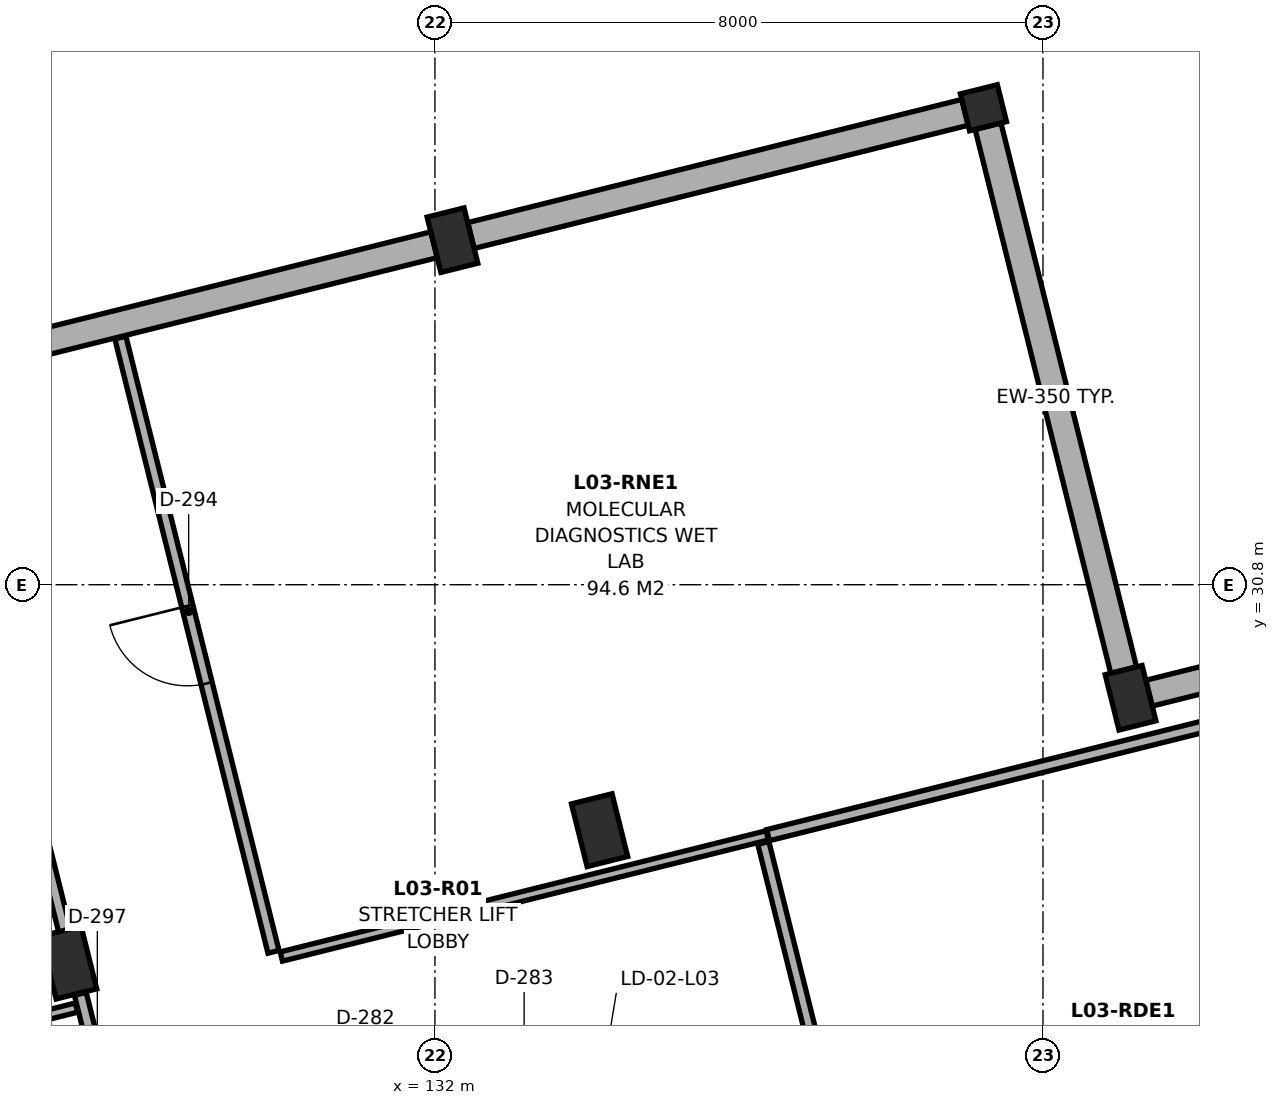
"""IFC4 building model, lengths in metres.
Left out: names, types, materials, properties, quantities, classifications, styles, units other than length and angle.
Written with IfcOpenShell. Run it as: python <this file> out.ifc"""

import sys

from ifc_helpers import new_model, si_unit, direction, frame, frame_2d, origin, origin_2d, place, context, subcontext, project, spatial, rectangle, extrude, element, fill, save


model = new_model("IFC4")
c1 = context("Model", 3, precision=1e-05, world=origin(), true_north=direction((0.0, 1.0)))
c2 = subcontext(c1, "Body", "Model", "MODEL_VIEW")
j1 = project(units=[si_unit("LENGTHUNIT", "METRE"), si_unit("PLANEANGLEUNIT", "RADIAN")], contexts=[c1])
p1 = place(None, origin())
s1 = spatial("IfcSite", under=j1, at=p1, CompositionType="ELEMENT")
p2 = place(p1, origin())
s2 = spatial("IfcBuilding", under=s1, at=p2, CompositionType="ELEMENT")
p3 = place(p2, frame((0.0, 0.0, 13.5)))
s3 = spatial("IfcBuildingStorey", under=s2, at=p3, CompositionType="ELEMENT", Elevation=13.5)
for number, where, z_axis, x_axis in (
    (1, (127.18, 25.829, 0.0), (0.0, 0.0, 1.0), (0.97, 0.242, 0.0)),
    (2, (134.166, 27.571, 0.0), (0.0, 0.0, 1.0), (0.97, 0.242, 0.0)),
):
    element("IfcColumn", number, at=place(p3, frame(where, z_axis=z_axis, x_axis=x_axis)), inside=s3, PredefinedType="COLUMN", context=c2, shape_type="SweptSolid", body=[
        extrude(rectangle(XDim=0.55, YDim=0.85, at=origin_2d()), origin(), (0.0, 0.0, 1.0), 3.72),
    ])
for number, where, z_axis, x_axis in (
    (3, (132.231, 35.333, 0.0), (0.0, 0.0, 1.0), (0.97, 0.242, 0.0)),
    (4, (141.152, 29.312, 0.0), (0.0, 0.0, 1.0), (0.97, 0.242, 0.0)),
):
    element("IfcColumn", number, at=place(p3, frame(where, z_axis=z_axis, x_axis=x_axis)), inside=s3, PredefinedType="COLUMN", context=c2, shape_type="SweptSolid", body=[
        extrude(rectangle(XDim=0.5, YDim=0.75, at=origin_2d()), origin(), (0.0, 0.0, 1.0), 3.72),
    ])
p4 = place(p3, frame((139.217, 37.075, 0.0), z_axis=(0.0, 0.0, 1.0), x_axis=(0.970295726276, 0.2419218956, 0.0)))
e5 = element("IfcColumn", 5, at=p4, inside=s3, PredefinedType="COLUMN", context=c2, shape_type="SweptSolid", body=[
    extrude(rectangle(XDim=0.5, YDim=0.5, at=origin_2d()), origin(), (0.0, 0.0, 1.0), 5.116),
])
p5 = place(p3, frame((139.277, 36.833, 0.0), z_axis=(0.0, 0.0, 1.0), x_axis=(0.241920240952, -0.970296138825, 0.0)))
e6 = element("IfcWall", 6, at=p5, inside=s3, PredefinedType="SOLIDWALL", context=c2, shape_type="SweptSolid", body=[
    extrude(rectangle(XDim=7.375, YDim=0.35, at=frame_2d((3.688, 0.0))), origin(), (0.0, 0.0, 1.0), 3.055),
])
p6 = place(p3, frame((141.395, 29.373, 0.0), z_axis=(0.0, 0.0, 1.0), x_axis=(0.970296633454, 0.241918257079, 0.0)))
e7 = element("IfcWall", 7, at=p6, inside=s3, PredefinedType="SOLIDWALL", context=c2, shape_type="SweptSolid", body=[
    extrude(rectangle(XDim=6.7, YDim=0.35, at=frame_2d((3.35, 0.0))), origin(), (0.0, 0.0, 1.0), 3.005),
])
p7 = place(p3, frame((125.487, 33.652, 0.0), z_axis=(0.0, 0.0, 1.0), x_axis=(0.970296633454, 0.241918257079, 0.0)))
e8 = element("IfcWall", 8, at=p7, inside=s3, PredefinedType="SOLIDWALL", context=c2, shape_type="SweptSolid", body=[
    extrude(rectangle(XDim=6.7, YDim=0.35, at=frame_2d((3.35, 0.0))), origin(), (0.0, 0.0, 1.0), 2.905),
])
p8 = place(p3, frame((132.473, 35.394, 0.0), z_axis=(0.0, 0.0, 1.0), x_axis=(0.970296633454, 0.241918257079, 0.0)))
e9 = element("IfcWall", 9, at=p8, inside=s3, PredefinedType="SOLIDWALL", context=c2, shape_type="SweptSolid", body=[
    extrude(rectangle(XDim=6.7, YDim=0.35, at=frame_2d((3.35, 0.0))), origin(), (0.0, 0.0, 1.0), 3.005),
])
p9 = place(p3, frame((128.0, 22.748, 0.0), z_axis=(0.0, 0.0, 1.0), x_axis=(-0.241929995817, 0.970293706629, 0.0)))
e10 = element("IfcWall", 10, at=p9, inside=s3, PredefinedType="PARTITIONING", context=c2, shape_type="SweptSolid", body=[
    extrude(rectangle(XDim=2.751, YDim=0.16, at=frame_2d((1.375, 0.0))), origin(), (0.0, 0.0, 1.0), 3.7),
])
p10 = place(p9, frame((0.65, 0.0, 0.0)))
e11 = element("IfcOpeningElement", 11, at=p10, cuts=e10, PredefinedType="OPENING", context=c2, shape_type="SweptSolid", body=[
    extrude(rectangle(XDim=1.45, YDim=2.26, at=frame_2d((0.725, 1.13))), frame((0.0, 0.092, 0.0), z_axis=(0.0, -1.0, 0.0), x_axis=(1.0, 0.0, 0.0)), (0.0, 0.0, 1.0), 0.184),
])
p11 = place(p3, frame((127.215, 25.894, 0.0), z_axis=(0.0, 0.0, 1.0), x_axis=(-0.241943923358, 0.970290233873, 0.0)))
e12 = element("IfcWall", 12, at=p11, inside=s3, PredefinedType="PARTITIONING", context=c2, shape_type="SweptSolid", body=[
    extrude(rectangle(XDim=7.573, YDim=0.16, at=frame_2d((3.787, 0.0))), origin(), (0.0, 0.0, 1.0), 2.905),
])
p12 = place(p11, frame((3.287, 0.0, 0.0)))
e13 = element("IfcOpeningElement", 13, at=p12, cuts=e12, PredefinedType="OPENING", context=c2, shape_type="SweptSolid", body=[
    extrude(rectangle(XDim=1.0, YDim=2.15, at=frame_2d((0.5, 1.075))), frame((0.0, 0.092, 0.0), z_axis=(0.0, -1.0, 0.0), x_axis=(1.0, 0.0, 0.0)), (0.0, 0.0, 1.0), 0.184),
])
p13 = place(p3, frame((129.876, 25.97, 0.0), z_axis=(0.0, 0.0, 1.0), x_axis=(-0.241935486341, 0.970292337623, 0.0)))
e14 = element("IfcWall", 14, at=p13, inside=s3, PredefinedType="PARTITIONING", context=c2, shape_type="SweptSolid", body=[
    extrude(rectangle(XDim=8.328, YDim=0.15, at=frame_2d((4.164, 0.0))), origin(), (0.0, 0.0, 1.0), 3.005),
])
p14 = place(p13, frame((3.639, 0.0, 0.0)))
e15 = element("IfcOpeningElement", 15, at=p14, cuts=e14, PredefinedType="OPENING", context=c2, shape_type="SweptSolid", body=[
    extrude(rectangle(XDim=1.05, YDim=2.15, at=frame_2d((0.525, 1.075))), frame((0.0, 0.087, 0.0), z_axis=(0.0, -1.0, 0.0), x_axis=(1.0, 0.0, 0.0)), (0.0, 0.0, 1.0), 0.174),
])
p15 = place(p3, frame((120.521, 23.55, 0.0), z_axis=(0.0, 0.0, 1.0), x_axis=(0.970292703498, 0.241934018977, 0.0)))
e16 = element("IfcWall", 16, at=p15, inside=s3, PredefinedType="PARTITIONING", context=c2, shape_type="SweptSolid", body=[
    extrude(rectangle(XDim=6.971, YDim=0.125, at=frame_2d((3.485, 0.0))), origin(), (0.0, 0.0, 1.0), 3.005),
])
p16 = place(p3, frame((136.383, 27.505, 0.0), z_axis=(0.0, 0.0, 1.0), x_axis=(0.970296878284, 0.241917275099, 0.0)))
e17 = element("IfcWall", 17, at=p16, inside=s3, PredefinedType="PARTITIONING", context=c2, shape_type="SweptSolid", body=[
    extrude(rectangle(XDim=12.078, YDim=0.15, at=frame_2d((6.039, 0.0))), origin(), (0.0, 0.0, 1.0), 3.005),
])
p17 = place(p3, frame((138.264, 19.611, 0.0), z_axis=(0.0, 0.0, 1.0), x_axis=(-0.241920353256, 0.970296110824, 0.0)))
e18 = element("IfcWall", 18, at=p17, inside=s3, PredefinedType="PARTITIONING", context=c2, shape_type="SweptSolid", body=[
    extrude(rectangle(XDim=8.03, YDim=0.15, at=frame_2d((4.015, 0.0))), origin(), (0.0, 0.0, 1.0), 3.005),
])
p18 = place(p3, frame((129.979, 25.908, 0.0), z_axis=(0.0, 0.0, 1.0), x_axis=(0.970297075448, 0.241916484304, 0.0)))
e19 = element("IfcWall", 19, at=p18, inside=s3, PredefinedType="PARTITIONING", context=c2, shape_type="SweptSolid", body=[
    extrude(rectangle(XDim=6.588, YDim=0.125, at=frame_2d((3.294, 0.0))), origin(), (0.0, 0.0, 1.0), 3.005),
])
p19 = place(p14, origin())
e20 = element("IfcDoor", 20, at=p19, inside=s3, OperationType="SINGLE_SWING_RIGHT", PredefinedType="DOOR", context=c2, shape_type="SweptSolid", body=[
    extrude(rectangle(XDim=1.05, YDim=2.15, at=frame_2d((0.525, 1.075))), frame((0.0, 0.025, 0.0), z_axis=(0.0, -1.0, 0.0), x_axis=(1.0, 0.0, 0.0)), (0.0, 0.0, 1.0), 0.05),
])
fill(e15, e20)
save(model, sys.argv[1])
